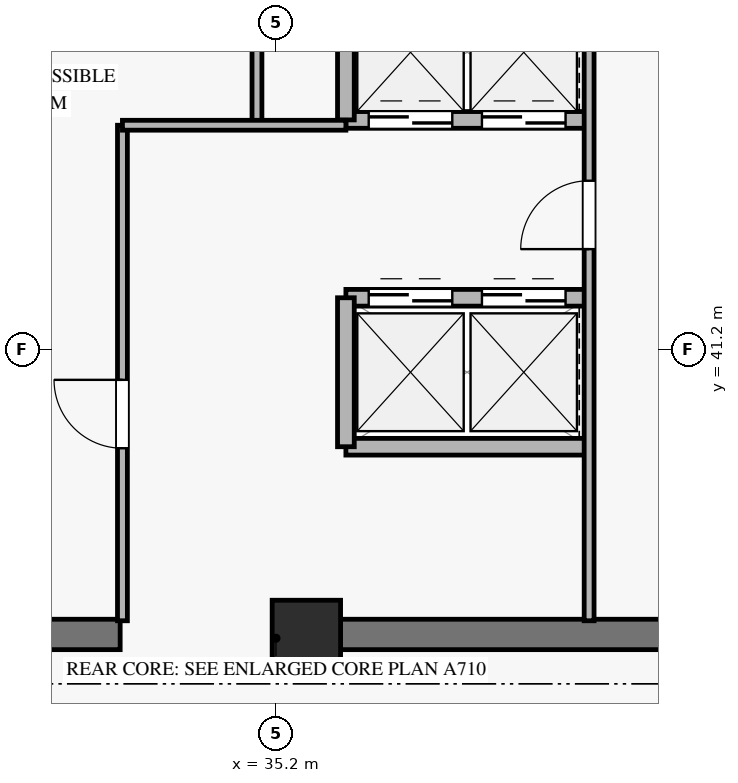
"""IFC4 building model, lengths in metres.
Left out: names, types, materials, properties, quantities, classifications, styles, units other than length and angle.
Written with IfcOpenShell. Run it as: python <this file> out.ifc"""

import sys

from ifc_helpers import new_model, si_unit, direction, frame, frame_2d, origin, origin_2d, place, context, subcontext, project, spatial, rectangle, extrude, source, transform, mapped, element, fill, save


model = new_model("IFC4")
c1 = context("Model", 3, precision=1e-05, world=origin(), true_north=direction((0.0, 1.0)))
c2 = subcontext(c1, "Body", "Model", "MODEL_VIEW")
j1 = project(units=[si_unit("LENGTHUNIT", "METRE"), si_unit("PLANEANGLEUNIT", "RADIAN")], contexts=[c1])
p1 = place(None, origin())
s1 = spatial("IfcSite", under=j1, at=p1, CompositionType="ELEMENT")
p2 = place(p1, origin())
s2 = spatial("IfcBuilding", under=s1, at=p2, CompositionType="ELEMENT")
p3 = place(p2, frame((0.0, 0.0, 272.3)))
s3 = spatial("IfcBuildingStorey", under=s2, at=p3, CompositionType="ELEMENT", Elevation=272.3)
m1 = source(origin(), c2, "Body", "SweptSolid", [
    extrude(rectangle(XDim=0.9, YDim=0.9, at=origin_2d()), origin(), (0.0, 0.0, 1.0), 3.185),
])
p4 = place(p3, frame((35.6, 37.45, 0.0), z_axis=(0.0, 0.0, 1.0), x_axis=(1.0, 0.0, 0.0)))
e1 = element("IfcColumn", 1, at=p4, inside=s3, PredefinedType="PILASTER", context=c2, shape_type="MappedRepresentation", body=[
    mapped(m1, transform((0.0, 0.0, 0.0), x_axis=(1.0, 0.0, 0.0), y_axis=(0.0, 1.0, 0.0), z_axis=(0.0, 0.0, 1.0), scale=1.0)),
])
p5 = place(p3, frame((31.25, 37.45, 0.0), z_axis=(0.0, 0.0, 1.0), x_axis=(1.0, 0.0, 0.0)))
e2 = element("IfcWall", 2, at=p5, inside=s3, PredefinedType="SHEAR", context=c2, shape_type="SweptSolid", body=[
    extrude(rectangle(XDim=1.9, YDim=0.4, at=frame_2d((0.95, 0.0))), origin(), (0.0, 0.0, 1.0), 3.185),
])
p6 = place(p3, frame((36.05, 37.45, 0.0), z_axis=(0.0, 0.0, 1.0), x_axis=(1.0, 0.0, 0.0)))
e3 = element("IfcWall", 3, at=p6, inside=s3, PredefinedType="SHEAR", context=c2, shape_type="SweptSolid", body=[
    extrude(rectangle(XDim=7.8, YDim=0.4, at=frame_2d((3.9, 0.0))), origin(), (0.0, 0.0, 1.0), 3.185),
])
p7 = place(p3, frame((36.12, 44.22, 0.0), z_axis=(0.0, 0.0, 1.0), x_axis=(1.0, 0.0, 0.0)))
e4 = element("IfcWall", 4, at=p7, inside=s3, PredefinedType="SOLIDWALL", context=c2, shape_type="SweptSolid", body=[
    extrude(rectangle(XDim=3.2, YDim=0.22, at=frame_2d((1.6, 0.0))), origin(), (0.0, 0.0, 1.0), 3.185),
])
p8 = place(p7, frame((0.3, 0.0, 0.0)))
e5 = element("IfcOpeningElement", 5, at=p8, cuts=e4, PredefinedType="OPENING", context=c2, shape_type="SweptSolid", body=[
    extrude(rectangle(XDim=1.1, YDim=2.2, at=frame_2d((0.55, 1.1))), frame((0.0, 0.12, 0.0), z_axis=(0.0, -1.0, 0.0), x_axis=(1.0, 0.0, 0.0)), (0.0, 0.0, 1.0), 0.24),
])
p9 = place(p7, frame((1.79, 0.0, 0.0)))
e6 = element("IfcOpeningElement", 6, at=p9, cuts=e4, PredefinedType="OPENING", context=c2, shape_type="SweptSolid", body=[
    extrude(rectangle(XDim=1.1, YDim=2.2, at=frame_2d((0.55, 1.1))), frame((0.0, 0.12, 0.0), z_axis=(0.0, -1.0, 0.0), x_axis=(1.0, 0.0, 0.0)), (0.0, 0.0, 1.0), 0.24),
])
p10 = place(p3, frame((36.12, 41.88, 0.0), z_axis=(0.0, 0.0, 1.0), x_axis=(1.0, 0.0, 0.0)))
e7 = element("IfcWall", 7, at=p10, inside=s3, PredefinedType="SOLIDWALL", context=c2, shape_type="SweptSolid", body=[
    extrude(rectangle(XDim=3.2, YDim=0.22, at=frame_2d((1.6, 0.0))), origin(), (0.0, 0.0, 1.0), 3.185),
])
p11 = place(p10, frame((0.3, 0.0, 0.0)))
e8 = element("IfcOpeningElement", 8, at=p11, cuts=e7, PredefinedType="OPENING", context=c2, shape_type="SweptSolid", body=[
    extrude(rectangle(XDim=1.1, YDim=2.2, at=frame_2d((0.55, 1.1))), frame((0.0, 0.12, 0.0), z_axis=(0.0, -1.0, 0.0), x_axis=(1.0, 0.0, 0.0)), (0.0, 0.0, 1.0), 0.24),
])
p12 = place(p10, frame((1.79, 0.0, 0.0)))
e9 = element("IfcOpeningElement", 9, at=p12, cuts=e7, PredefinedType="OPENING", context=c2, shape_type="SweptSolid", body=[
    extrude(rectangle(XDim=1.1, YDim=2.2, at=frame_2d((0.55, 1.1))), frame((0.0, 0.12, 0.0), z_axis=(0.0, -1.0, 0.0), x_axis=(1.0, 0.0, 0.0)), (0.0, 0.0, 1.0), 0.24),
])
p13 = place(p3, frame((36.12, 39.92, 0.0), z_axis=(0.0, 0.0, 1.0), x_axis=(1.0, 0.0, 0.0)))
e10 = element("IfcWall", 10, at=p13, inside=s3, PredefinedType="SOLIDWALL", context=c2, shape_type="SweptSolid", body=[
    extrude(rectangle(XDim=3.2, YDim=0.22, at=frame_2d((1.6, 0.0))), origin(), (0.0, 0.0, 1.0), 3.185),
])
p14 = place(p3, frame((36.12, 39.92, 0.0), z_axis=(0.0, 0.0, 1.0), x_axis=(0.0, 1.0, 0.0)))
e11 = element("IfcWall", 11, at=p14, inside=s3, PredefinedType="SOLIDWALL", context=c2, shape_type="SweptSolid", body=[
    extrude(rectangle(XDim=1.96, YDim=0.22, at=frame_2d((0.98, 0.0))), origin(), (0.0, 0.0, 1.0), 3.185),
])
p15 = place(p3, frame((36.12, 44.22, 0.0), z_axis=(0.0, 0.0, 1.0), x_axis=(0.0, 1.0, 0.0)))
e12 = element("IfcWall", 12, at=p15, inside=s3, PredefinedType="SOLIDWALL", context=c2, shape_type="SweptSolid", body=[
    extrude(rectangle(XDim=2.15, YDim=0.22, at=frame_2d((1.075, 0.0))), origin(), (0.0, 0.0, 1.0), 3.185),
])
p16 = place(p3, frame((33.18, 37.63, 0.0), z_axis=(0.0, 0.0, 1.0), x_axis=(0.0, 1.0, 0.0)))
e13 = element("IfcWall", 13, at=p16, inside=s3, PredefinedType="PARTITIONING", context=c2, shape_type="SweptSolid", body=[
    extrude(rectangle(XDim=6.52, YDim=0.13, at=frame_2d((3.26, 0.0))), origin(), (0.0, 0.0, 1.0), 2.27),
])
p17 = place(p16, frame((2.27, 0.0, 0.0)))
e14 = element("IfcOpeningElement", 14, at=p17, cuts=e13, PredefinedType="OPENING", context=c2, shape_type="SweptSolid", body=[
    extrude(rectangle(XDim=0.9, YDim=2.1, at=frame_2d((0.45, 1.05))), frame((0.0, 0.075, 0.0), z_axis=(0.0, -1.0, 0.0), x_axis=(1.0, 0.0, 0.0)), (0.0, 0.0, 1.0), 0.15),
])
p18 = place(p3, frame((34.95, 44.15, 0.0), z_axis=(0.0, 0.0, 1.0), x_axis=(0.0, 1.0, 0.0)))
e15 = element("IfcWall", 15, at=p18, inside=s3, PredefinedType="PARTITIONING", context=c2, shape_type="SweptSolid", body=[
    extrude(rectangle(XDim=2.22, YDim=0.13, at=frame_2d((1.11, 0.0))), origin(), (0.0, 0.0, 1.0), 3.185),
])
p19 = place(p3, frame((33.18, 44.15, 0.0), z_axis=(0.0, 0.0, 1.0), x_axis=(1.0, 0.0, 0.0)))
e16 = element("IfcWall", 16, at=p19, inside=s3, PredefinedType="PARTITIONING", context=c2, shape_type="SweptSolid", body=[
    extrude(rectangle(XDim=2.94, YDim=0.13, at=frame_2d((1.47, 0.0))), origin(), (0.0, 0.0, 1.0), 2.47),
])
p20 = place(p3, frame((39.32, 37.63, 0.0), z_axis=(0.0, 0.0, 1.0), x_axis=(0.0, 1.0, 0.0)))
e17 = element("IfcWall", 17, at=p20, inside=s3, PredefinedType="PARTITIONING", context=c2, shape_type="SweptSolid", body=[
    extrude(rectangle(XDim=8.74, YDim=0.13, at=frame_2d((4.37, 0.0))), origin(), (0.0, 0.0, 1.0), 3.185),
])
p21 = place(p20, frame((4.89, 0.0, 0.0)))
e18 = element("IfcOpeningElement", 18, at=p21, cuts=e17, PredefinedType="OPENING", context=c2, shape_type="SweptSolid", body=[
    extrude(rectangle(XDim=0.9, YDim=2.1, at=frame_2d((0.45, 1.05))), frame((0.0, 0.075, 0.0), z_axis=(0.0, -1.0, 0.0), x_axis=(1.0, 0.0, 0.0)), (0.0, 0.0, 1.0), 0.15),
])
m2 = source(origin(), c2, "Body", "SweptSolid", [
    extrude(rectangle(XDim=1.1, YDim=2.2, at=frame_2d((0.55, 1.1))), frame((0.0, 0.025, 0.0), z_axis=(0.0, -1.0, 0.0), x_axis=(1.0, 0.0, 0.0)), (0.0, 0.0, 1.0), 0.05),
])
p22 = place(p8, origin())
e19 = element("IfcDoor", 19, at=p22, inside=s3, OperationType="SLIDING_TO_LEFT", PredefinedType="DOOR", context=c2, shape_type="MappedRepresentation", body=[
    mapped(m2, transform((0.0, 0.0, 0.0), x_axis=(1.0, 0.0, 0.0), y_axis=(0.0, 1.0, 0.0), z_axis=(0.0, 0.0, 1.0), scale=1.0)),
])
fill(e5, e19)
p23 = place(p9, origin())
e20 = element("IfcDoor", 20, at=p23, inside=s3, OperationType="SLIDING_TO_LEFT", PredefinedType="DOOR", context=c2, shape_type="MappedRepresentation", body=[
    mapped(m2, transform((0.0, 0.0, 0.0), x_axis=(1.0, 0.0, 0.0), y_axis=(0.0, 1.0, 0.0), z_axis=(0.0, 0.0, 1.0), scale=1.0)),
])
fill(e6, e20)
p24 = place(p11, origin())
e21 = element("IfcDoor", 21, at=p24, inside=s3, OperationType="SLIDING_TO_LEFT", PredefinedType="DOOR", context=c2, shape_type="MappedRepresentation", body=[
    mapped(m2, transform((0.0, 0.0, 0.0), x_axis=(1.0, 0.0, 0.0), y_axis=(0.0, 1.0, 0.0), z_axis=(0.0, 0.0, 1.0), scale=1.0)),
])
fill(e8, e21)
p25 = place(p12, origin())
e22 = element("IfcDoor", 22, at=p25, inside=s3, OperationType="SLIDING_TO_LEFT", PredefinedType="DOOR", context=c2, shape_type="MappedRepresentation", body=[
    mapped(m2, transform((0.0, 0.0, 0.0), x_axis=(1.0, 0.0, 0.0), y_axis=(0.0, 1.0, 0.0), z_axis=(0.0, 0.0, 1.0), scale=1.0)),
])
fill(e9, e22)
m3 = source(origin(), c2, "Body", "SweptSolid", [
    extrude(rectangle(XDim=0.9, YDim=2.1, at=frame_2d((0.45, 1.05))), frame((0.0, 0.025, 0.0), z_axis=(0.0, -1.0, 0.0), x_axis=(1.0, 0.0, 0.0)), (0.0, 0.0, 1.0), 0.05),
])
p26 = place(p17, origin())
e23 = element("IfcDoor", 23, at=p26, inside=s3, OperationType="SINGLE_SWING_RIGHT", PredefinedType="DOOR", context=c2, shape_type="MappedRepresentation", body=[
    mapped(m3, transform((0.0, 0.0, 0.0), x_axis=(1.0, 0.0, 0.0), y_axis=(0.0, 1.0, 0.0), z_axis=(0.0, 0.0, 1.0), scale=1.0)),
])
fill(e14, e23)
p27 = place(p21, origin())
e24 = element("IfcDoor", 24, at=p27, inside=s3, OperationType="SINGLE_SWING_LEFT", PredefinedType="DOOR", context=c2, shape_type="MappedRepresentation", body=[
    mapped(m3, transform((0.0, 0.0, 0.0), x_axis=(1.0, 0.0, 0.0), y_axis=(0.0, 1.0, 0.0), z_axis=(0.0, 0.0, 1.0), scale=1.0)),
])
fill(e18, e24)
save(model, sys.argv[1])
